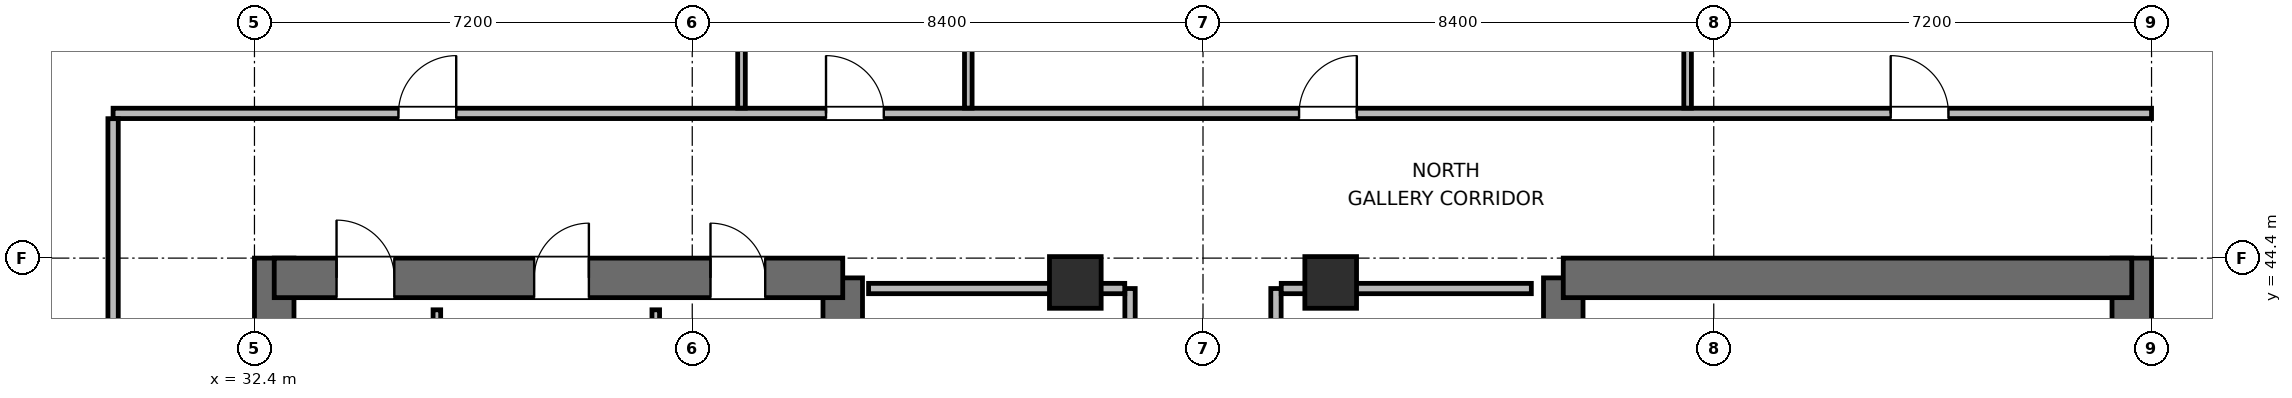
"""IFC4 building model, lengths in metres.
Left out: names, types, materials, properties, quantities, classifications, styles, units other than length and angle.
Written with IfcOpenShell. Run it as: python <this file> out.ifc"""

import sys

from ifc_helpers import new_model, si_unit, direction, frame, frame_2d, origin, origin_2d, place, context, subcontext, project, spatial, rectangle, extrude, element, fill, save


model = new_model("IFC4")
c1 = context("Model", 3, precision=1e-05, world=origin(), true_north=direction((0.0, 1.0)))
c2 = subcontext(c1, "Body", "Model", "MODEL_VIEW")
j1 = project(units=[si_unit("LENGTHUNIT", "METRE"), si_unit("PLANEANGLEUNIT", "RADIAN")], contexts=[c1])
p1 = place(None, origin())
s1 = spatial("IfcSite", under=j1, at=p1, CompositionType="ELEMENT")
p2 = place(p1, origin())
s2 = spatial("IfcBuilding", under=s1, at=p2, CompositionType="ELEMENT")
p3 = place(p2, frame((0.0, 0.0, 247.2)))
s3 = spatial("IfcBuildingStorey", under=s2, at=p3, CompositionType="ELEMENT", Elevation=247.2)
p4 = place(p3, frame((32.725, 27.6, 0.0), z_axis=(0.0, 0.0, 1.0), x_axis=(0.0, 1.0, 0.0)))
e1 = element("IfcWall", 1, at=p4, inside=s3, PredefinedType="SHEAR", context=c2, shape_type="SweptSolid", body=[
    extrude(rectangle(XDim=16.8, YDim=0.65, at=frame_2d((8.4, 0.0))), origin(), (0.0, 0.0, 1.0), 3.9),
])
p5 = place(p3, frame((42.075, 37.8, 0.0), z_axis=(0.0, 0.0, 1.0), x_axis=(0.0, 1.0, 0.0)))
e2 = element("IfcWall", 2, at=p5, inside=s3, PredefinedType="SHEAR", context=c2, shape_type="SweptSolid", body=[
    extrude(rectangle(XDim=6.275, YDim=0.65, at=frame_2d((3.137, 0.0))), origin(), (0.0, 0.0, 1.0), 3.9),
])
p6 = place(p3, frame((32.725, 44.075, 0.0), z_axis=(0.0, 0.0, 1.0), x_axis=(1.0, 0.0, 0.0)))
e3 = element("IfcWall", 3, at=p6, inside=s3, PredefinedType="SHEAR", context=c2, shape_type="SweptSolid", body=[
    extrude(rectangle(XDim=9.35, YDim=0.65, at=frame_2d((4.675, 0.0))), origin(), (0.0, 0.0, 1.0), 3.9),
])
p7 = place(p6, frame((1.025, 0.0, 0.0)))
e4 = element("IfcOpeningElement", 4, at=p7, cuts=e3, PredefinedType="OPENING", context=c2, shape_type="SweptSolid", body=[
    extrude(rectangle(XDim=0.95, YDim=2.04, at=frame_2d((0.475, 1.02))), frame((0.0, 0.335, 0.0), z_axis=(0.0, -1.0, 0.0), x_axis=(1.0, 0.0, 0.0)), (0.0, 0.0, 1.0), 0.67),
])
p8 = place(p6, frame((4.275, 0.0, 0.0)))
e5 = element("IfcOpeningElement", 5, at=p8, cuts=e3, PredefinedType="OPENING", context=c2, shape_type="SweptSolid", body=[
    extrude(rectangle(XDim=0.9, YDim=2.02, at=frame_2d((0.45, 1.01))), frame((0.0, 0.335, 0.0), z_axis=(0.0, -1.0, 0.0), x_axis=(1.0, 0.0, 0.0)), (0.0, 0.0, 1.0), 0.67),
])
p9 = place(p6, frame((7.175, 0.0, 0.0)))
e6 = element("IfcOpeningElement", 6, at=p9, cuts=e3, PredefinedType="OPENING", context=c2, shape_type="SweptSolid", body=[
    extrude(rectangle(XDim=0.9, YDim=2.02, at=frame_2d((0.45, 1.01))), frame((0.0, 0.335, 0.0), z_axis=(0.0, -1.0, 0.0), x_axis=(1.0, 0.0, 0.0)), (0.0, 0.0, 1.0), 0.67),
])
p10 = place(p3, frame((53.925, 38.0, 0.0), z_axis=(0.0, 0.0, 1.0), x_axis=(0.0, 1.0, 0.0)))
e7 = element("IfcWall", 7, at=p10, inside=s3, PredefinedType="SHEAR", context=c2, shape_type="SweptSolid", body=[
    extrude(rectangle(XDim=6.075, YDim=0.65, at=frame_2d((3.038, 0.0))), origin(), (0.0, 0.0, 1.0), 3.9),
])
p11 = place(p3, frame((63.275, 27.6, 0.0), z_axis=(0.0, 0.0, 1.0), x_axis=(0.0, 1.0, 0.0)))
e8 = element("IfcWall", 8, at=p11, inside=s3, PredefinedType="SHEAR", context=c2, shape_type="SweptSolid", body=[
    extrude(rectangle(XDim=16.8, YDim=0.65, at=frame_2d((8.4, 0.0))), origin(), (0.0, 0.0, 1.0), 3.9),
])
p12 = place(p3, frame((53.925, 44.075, 0.0), z_axis=(0.0, 0.0, 1.0), x_axis=(1.0, 0.0, 0.0)))
e9 = element("IfcWall", 9, at=p12, inside=s3, PredefinedType="SHEAR", context=c2, shape_type="SweptSolid", body=[
    extrude(rectangle(XDim=9.35, YDim=0.65, at=frame_2d((4.675, 0.0))), origin(), (0.0, 0.0, 1.0), 3.9),
])
for number, where, z_axis, x_axis in (
    (10, (45.9, 44.0, 0.0), (0.0, 0.0, 1.0), (1.0, 0.0, 0.0)),
    (11, (50.1, 44.0, 0.0), (0.0, 0.0, 1.0), (1.0, 0.0, 0.0)),
):
    element("IfcColumn", number, at=place(p3, frame(where, z_axis=z_axis, x_axis=x_axis)), inside=s3, PredefinedType="COLUMN", context=c2, shape_type="SweptSolid", body=[
        extrude(rectangle(XDim=0.85, YDim=0.85, at=origin_2d()), origin(), (0.0, 0.0, 1.0), 3.9),
    ])
for number, where, z_axis, x_axis in (
    (12, (35.4, 41.095, 0.0), (0.0, 0.0, 1.0), (0.0, 1.0, 0.0)),
    (13, (39.0, 41.095, 0.0), (0.0, 0.0, 1.0), (0.0, 1.0, 0.0)),
):
    element("IfcWall", number, at=place(p3, frame(where, z_axis=z_axis, x_axis=x_axis)), inside=s3, PredefinedType="PARTITIONING", context=c2, shape_type="SweptSolid", body=[
        extrude(rectangle(XDim=2.455, YDim=0.125, at=frame_2d((1.228, 0.0))), origin(), (0.0, 0.0, 1.0), 3.68),
    ])
p13 = place(p3, frame((46.8, 37.9, 0.0), z_axis=(0.0, 0.0, 1.0), x_axis=(0.0, 1.0, 0.0)))
e14 = element("IfcWall", 14, at=p13, inside=s3, PredefinedType="PARTITIONING", context=c2, shape_type="SweptSolid", body=[
    extrude(rectangle(XDim=6.0, YDim=0.17, at=frame_2d((3.0, 0.0))), origin(), (0.0, 0.0, 1.0), 3.68),
])
p14 = place(p13, frame((0.69, 0.0, 0.0)))
e15 = element("IfcOpeningElement", 15, at=p14, cuts=e14, PredefinedType="OPENING", context=c2, shape_type="SweptSolid", body=[
    extrude(rectangle(XDim=0.9, YDim=2.02, at=frame_2d((0.45, 1.01))), frame((0.0, 0.095, 0.0), z_axis=(0.0, -1.0, 0.0), x_axis=(1.0, 0.0, 0.0)), (0.0, 0.0, 1.0), 0.19),
])
p15 = place(p13, frame((3.69, 0.0, 0.0)))
e16 = element("IfcOpeningElement", 16, at=p15, cuts=e14, PredefinedType="OPENING", context=c2, shape_type="SweptSolid", body=[
    extrude(rectangle(XDim=0.9, YDim=2.02, at=frame_2d((0.45, 1.01))), frame((0.0, 0.095, 0.0), z_axis=(0.0, -1.0, 0.0), x_axis=(1.0, 0.0, 0.0)), (0.0, 0.0, 1.0), 0.19),
])
p16 = place(p3, frame((42.5, 43.9, 0.0), z_axis=(0.0, 0.0, 1.0), x_axis=(1.0, 0.0, 0.0)))
e17 = element("IfcWall", 17, at=p16, inside=s3, PredefinedType="PARTITIONING", context=c2, shape_type="SweptSolid", body=[
    extrude(rectangle(XDim=4.213, YDim=0.17, at=frame_2d((2.106, 0.0))), origin(), (0.0, 0.0, 1.0), 2.765),
])
p17 = place(p3, frame((49.2, 37.9, 0.0), z_axis=(0.0, 0.0, 1.0), x_axis=(0.0, 1.0, 0.0)))
e18 = element("IfcWall", 18, at=p17, inside=s3, PredefinedType="PARTITIONING", context=c2, shape_type="SweptSolid", body=[
    extrude(rectangle(XDim=6.0, YDim=0.17, at=frame_2d((3.0, 0.0))), origin(), (0.0, 0.0, 1.0), 3.68),
])
p18 = place(p17, frame((0.54, 0.0, 0.0)))
e19 = element("IfcOpeningElement", 19, at=p18, cuts=e18, PredefinedType="OPENING", context=c2, shape_type="SweptSolid", body=[
    extrude(rectangle(XDim=0.9, YDim=2.02, at=frame_2d((0.45, 1.01))), frame((0.0, 0.095, 0.0), z_axis=(0.0, -1.0, 0.0), x_axis=(1.0, 0.0, 0.0)), (0.0, 0.0, 1.0), 0.19),
])
p19 = place(p17, frame((2.55, 0.0, 0.0)))
e20 = element("IfcOpeningElement", 20, at=p19, cuts=e18, PredefinedType="OPENING", context=c2, shape_type="SweptSolid", body=[
    extrude(rectangle(XDim=0.9, YDim=2.02, at=frame_2d((0.45, 1.01))), frame((0.0, 0.095, 0.0), z_axis=(0.0, -1.0, 0.0), x_axis=(1.0, 0.0, 0.0)), (0.0, 0.0, 1.0), 0.19),
])
p20 = place(p17, frame((4.56, 0.0, 0.0)))
e21 = element("IfcOpeningElement", 21, at=p20, cuts=e18, PredefinedType="OPENING", context=c2, shape_type="SweptSolid", body=[
    extrude(rectangle(XDim=0.9, YDim=2.02, at=frame_2d((0.45, 1.01))), frame((0.0, 0.095, 0.0), z_axis=(0.0, -1.0, 0.0), x_axis=(1.0, 0.0, 0.0)), (0.0, 0.0, 1.0), 0.19),
])
p21 = place(p3, frame((49.287, 43.9, 0.0), z_axis=(0.0, 0.0, 1.0), x_axis=(1.0, 0.0, 0.0)))
e22 = element("IfcWall", 22, at=p21, inside=s3, PredefinedType="PARTITIONING", context=c2, shape_type="SweptSolid", body=[
    extrude(rectangle(XDim=4.113, YDim=0.17, at=frame_2d((2.056, 0.0))), origin(), (0.0, 0.0, 1.0), 2.765),
])
p22 = place(p3, frame((30.075, 46.78, 0.0), z_axis=(0.0, 0.0, 1.0), x_axis=(1.0, 0.0, 0.0)))
e23 = element("IfcWall", 23, at=p22, inside=s3, PredefinedType="PARTITIONING", context=c2, shape_type="SweptSolid", body=[
    extrude(rectangle(XDim=33.525, YDim=0.17, at=frame_2d((16.763, 0.0))), origin(), (0.0, 0.0, 1.0), 3.68),
])
p23 = place(p22, frame((4.693, 0.0, 0.0)))
e24 = element("IfcOpeningElement", 24, at=p23, cuts=e23, PredefinedType="OPENING", context=c2, shape_type="SweptSolid", body=[
    extrude(rectangle(XDim=0.95, YDim=2.04, at=frame_2d((0.475, 1.02))), frame((0.0, 0.095, 0.0), z_axis=(0.0, -1.0, 0.0), x_axis=(1.0, 0.0, 0.0)), (0.0, 0.0, 1.0), 0.19),
])
p24 = place(p22, frame((11.725, 0.0, 0.0)))
e25 = element("IfcOpeningElement", 25, at=p24, cuts=e23, PredefinedType="OPENING", context=c2, shape_type="SweptSolid", body=[
    extrude(rectangle(XDim=0.95, YDim=2.04, at=frame_2d((0.475, 1.02))), frame((0.0, 0.095, 0.0), z_axis=(0.0, -1.0, 0.0), x_axis=(1.0, 0.0, 0.0)), (0.0, 0.0, 1.0), 0.19),
])
p25 = place(p22, frame((19.505, 0.0, 0.0)))
e26 = element("IfcOpeningElement", 26, at=p25, cuts=e23, PredefinedType="OPENING", context=c2, shape_type="SweptSolid", body=[
    extrude(rectangle(XDim=0.95, YDim=2.04, at=frame_2d((0.475, 1.02))), frame((0.0, 0.095, 0.0), z_axis=(0.0, -1.0, 0.0), x_axis=(1.0, 0.0, 0.0)), (0.0, 0.0, 1.0), 0.19),
])
p26 = place(p22, frame((29.235, 0.0, 0.0)))
e27 = element("IfcOpeningElement", 27, at=p26, cuts=e23, PredefinedType="OPENING", context=c2, shape_type="SweptSolid", body=[
    extrude(rectangle(XDim=0.95, YDim=2.04, at=frame_2d((0.475, 1.02))), frame((0.0, 0.095, 0.0), z_axis=(0.0, -1.0, 0.0), x_axis=(1.0, 0.0, 0.0)), (0.0, 0.0, 1.0), 0.19),
])
p27 = place(p3, frame((30.075, 25.307, 0.0), z_axis=(0.0, 0.0, 1.0), x_axis=(0.0, 1.0, 0.0)))
e28 = element("IfcWall", 28, at=p27, inside=s3, PredefinedType="PARTITIONING", context=c2, shape_type="SweptSolid", body=[
    extrude(rectangle(XDim=21.386, YDim=0.17, at=frame_2d((10.693, 0.0))), origin(), (0.0, 0.0, 1.0), 3.68),
])
p28 = place(p27, frame((4.428, 0.0, 0.0)))
e29 = element("IfcOpeningElement", 29, at=p28, cuts=e28, PredefinedType="OPENING", context=c2, shape_type="SweptSolid", body=[
    extrude(rectangle(XDim=0.95, YDim=2.04, at=frame_2d((0.475, 1.02))), frame((0.0, 0.095, 0.0), z_axis=(0.0, -1.0, 0.0), x_axis=(1.0, 0.0, 0.0)), (0.0, 0.0, 1.0), 0.19),
])
p29 = place(p27, frame((15.208, 0.0, 0.0)))
e30 = element("IfcOpeningElement", 30, at=p29, cuts=e28, PredefinedType="OPENING", context=c2, shape_type="SweptSolid", body=[
    extrude(rectangle(XDim=0.95, YDim=2.04, at=frame_2d((0.475, 1.02))), frame((0.0, 0.095, 0.0), z_axis=(0.0, -1.0, 0.0), x_axis=(1.0, 0.0, 0.0)), (0.0, 0.0, 1.0), 0.19),
])
p30 = place(p3, frame((40.41, 46.867, 0.0), z_axis=(0.0, 0.0, 1.0), x_axis=(0.0, 1.0, 0.0)))
e31 = element("IfcWall", 31, at=p30, inside=s3, PredefinedType="PARTITIONING", context=c2, shape_type="SweptSolid", body=[
    extrude(rectangle(XDim=15.298, YDim=0.125, at=frame_2d((7.649, 0.0))), origin(), (0.0, 0.0, 1.0), 3.043),
])
p31 = place(p3, frame((44.14, 46.867, 0.0), z_axis=(0.0, 0.0, 1.0), x_axis=(0.0, 1.0, 0.0)))
e32 = element("IfcWall", 32, at=p31, inside=s3, PredefinedType="PARTITIONING", context=c2, shape_type="SweptSolid", body=[
    extrude(rectangle(XDim=13.858, YDim=0.125, at=frame_2d((6.929, 0.0))), origin(), (0.0, 0.0, 1.0), 3.043),
])
p32 = place(p3, frame((55.97, 46.867, 0.0), z_axis=(0.0, 0.0, 1.0), x_axis=(0.0, 1.0, 0.0)))
e33 = element("IfcWall", 33, at=p32, inside=s3, PredefinedType="PARTITIONING", context=c2, shape_type="SweptSolid", body=[
    extrude(rectangle(XDim=15.258, YDim=0.125, at=frame_2d((7.629, 0.0))), origin(), (0.0, 0.0, 1.0), 3.043),
])
p33 = place(p7, origin())
e34 = element("IfcDoor", 34, at=p33, inside=s3, OperationType="SINGLE_SWING_LEFT", PredefinedType="DOOR", context=c2, shape_type="SweptSolid", body=[
    extrude(rectangle(XDim=0.95, YDim=2.04, at=frame_2d((0.475, 1.02))), frame((0.0, 0.025, 0.0), z_axis=(0.0, -1.0, 0.0), x_axis=(1.0, 0.0, 0.0)), (0.0, 0.0, 1.0), 0.05),
])
fill(e4, e34)
p34 = place(p8, origin())
e35 = element("IfcDoor", 35, at=p34, inside=s3, OperationType="SINGLE_SWING_RIGHT", PredefinedType="DOOR", context=c2, shape_type="SweptSolid", body=[
    extrude(rectangle(XDim=0.9, YDim=2.02, at=frame_2d((0.45, 1.01))), frame((0.0, 0.025, 0.0), z_axis=(0.0, -1.0, 0.0), x_axis=(1.0, 0.0, 0.0)), (0.0, 0.0, 1.0), 0.05),
])
fill(e5, e35)
p35 = place(p9, origin())
e36 = element("IfcDoor", 36, at=p35, inside=s3, OperationType="SINGLE_SWING_LEFT", PredefinedType="DOOR", context=c2, shape_type="SweptSolid", body=[
    extrude(rectangle(XDim=0.9, YDim=2.02, at=frame_2d((0.45, 1.01))), frame((0.0, 0.025, 0.0), z_axis=(0.0, -1.0, 0.0), x_axis=(1.0, 0.0, 0.0)), (0.0, 0.0, 1.0), 0.05),
])
fill(e6, e36)
p36 = place(p23, origin())
e37 = element("IfcDoor", 37, at=p36, inside=s3, OperationType="SINGLE_SWING_RIGHT", PredefinedType="DOOR", context=c2, shape_type="SweptSolid", body=[
    extrude(rectangle(XDim=0.95, YDim=2.04, at=frame_2d((0.475, 1.02))), frame((0.0, 0.025, 0.0), z_axis=(0.0, -1.0, 0.0), x_axis=(1.0, 0.0, 0.0)), (0.0, 0.0, 1.0), 0.05),
])
fill(e24, e37)
p37 = place(p24, origin())
e38 = element("IfcDoor", 38, at=p37, inside=s3, OperationType="SINGLE_SWING_LEFT", PredefinedType="DOOR", context=c2, shape_type="SweptSolid", body=[
    extrude(rectangle(XDim=0.95, YDim=2.04, at=frame_2d((0.475, 1.02))), frame((0.0, 0.025, 0.0), z_axis=(0.0, -1.0, 0.0), x_axis=(1.0, 0.0, 0.0)), (0.0, 0.0, 1.0), 0.05),
])
fill(e25, e38)
p38 = place(p25, origin())
e39 = element("IfcDoor", 39, at=p38, inside=s3, OperationType="SINGLE_SWING_RIGHT", PredefinedType="DOOR", context=c2, shape_type="SweptSolid", body=[
    extrude(rectangle(XDim=0.95, YDim=2.04, at=frame_2d((0.475, 1.02))), frame((0.0, 0.025, 0.0), z_axis=(0.0, -1.0, 0.0), x_axis=(1.0, 0.0, 0.0)), (0.0, 0.0, 1.0), 0.05),
])
fill(e26, e39)
p39 = place(p26, origin())
e40 = element("IfcDoor", 40, at=p39, inside=s3, OperationType="SINGLE_SWING_LEFT", PredefinedType="DOOR", context=c2, shape_type="SweptSolid", body=[
    extrude(rectangle(XDim=0.95, YDim=2.04, at=frame_2d((0.475, 1.02))), frame((0.0, 0.025, 0.0), z_axis=(0.0, -1.0, 0.0), x_axis=(1.0, 0.0, 0.0)), (0.0, 0.0, 1.0), 0.05),
])
fill(e27, e40)
save(model, sys.argv[1])
